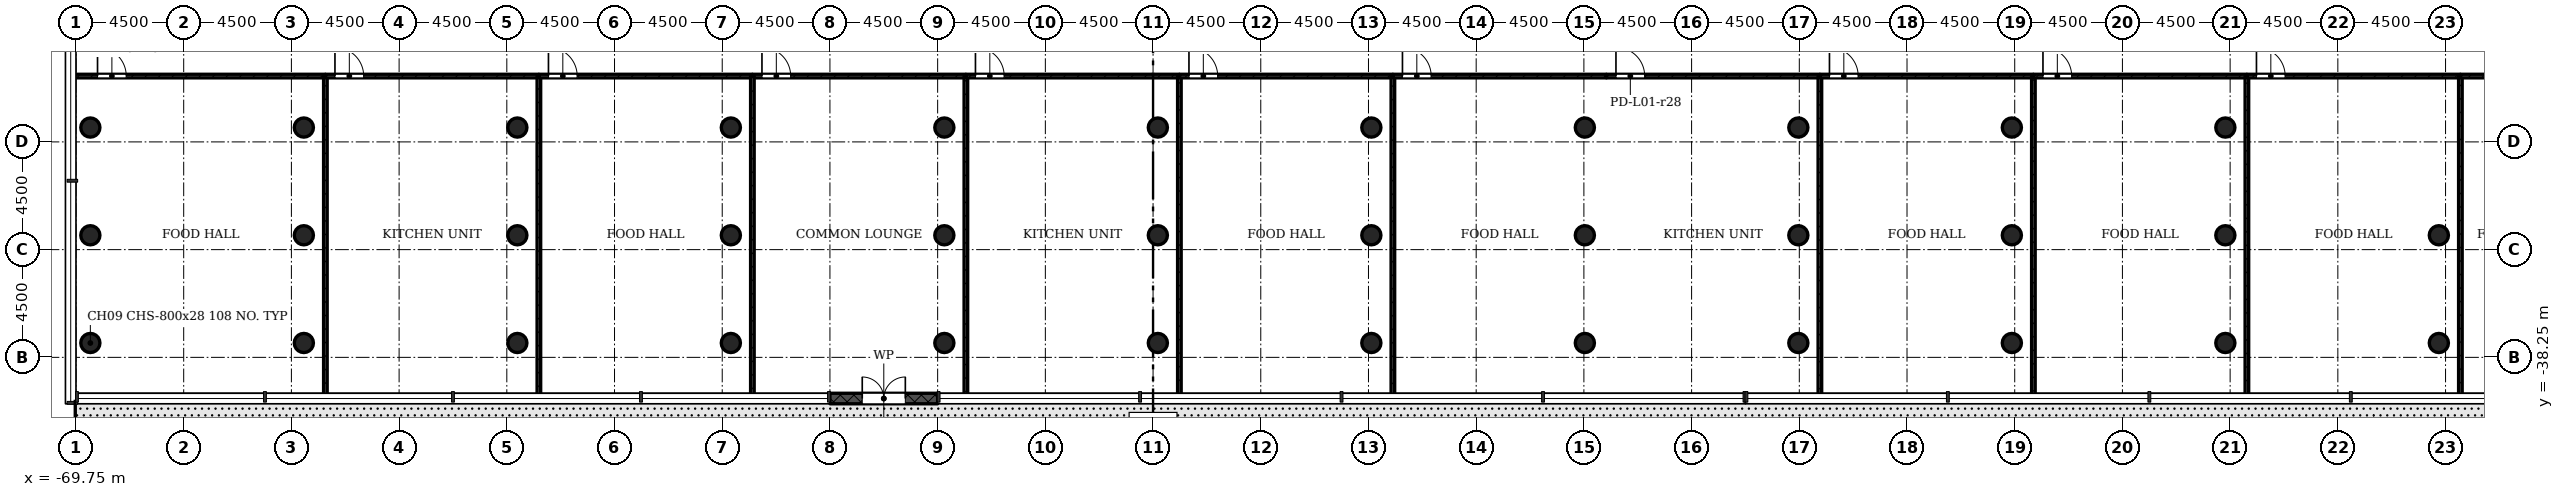
"""IFC4 building model, lengths in metres.
Left out: names, types, materials, properties, quantities, classifications, styles, units other than length and angle.
Written with IfcOpenShell. Run it as: python <this file> out.ifc"""

import sys

from ifc_helpers import new_model, si_unit, direction, frame, frame_2d, origin, origin_2d, place, context, subcontext, project, spatial, rectangle, hollow_circle, extrude, element, fill, save


model = new_model("IFC4")
c1 = context("Model", 3, precision=1e-05, world=origin(), true_north=direction((0.0, 1.0)))
c2 = subcontext(c1, "Body", "Model", "MODEL_VIEW")
j1 = project(units=[si_unit("LENGTHUNIT", "METRE"), si_unit("PLANEANGLEUNIT", "RADIAN")], contexts=[c1])
p1 = place(None, origin())
s1 = spatial("IfcSite", under=j1, at=p1, CompositionType="ELEMENT")
p2 = place(p1, origin())
s2 = spatial("IfcBuilding", under=s1, at=p2, CompositionType="ELEMENT")
p3 = place(p2, frame((0.0, 0.0, 6.0)))
s3 = spatial("IfcBuildingStorey", under=s2, at=p3, CompositionType="ELEMENT", Elevation=6.0)
for number, where, z_axis, x_axis in (
    (1, (-69.15, -37.65, 0.0), (0.0, 0.0, 1.0), (1.0, 0.0, 0.0)),
    (2, (-60.23, -37.65, 0.0), (0.0, 0.0, 1.0), (1.0, 0.0, 0.0)),
    (3, (-51.31, -37.65, 0.0), (0.0, 0.0, 1.0), (1.0, 0.0, 0.0)),
    (4, (-42.39, -37.65, 0.0), (0.0, 0.0, 1.0), (1.0, 0.0, 0.0)),
    (5, (-33.47, -37.65, 0.0), (0.0, 0.0, 1.0), (1.0, 0.0, 0.0)),
    (6, (-24.55, -37.65, 0.0), (0.0, 0.0, 1.0), (1.0, 0.0, 0.0)),
    (7, (-15.63, -37.65, 0.0), (0.0, 0.0, 1.0), (1.0, 0.0, 0.0)),
    (8, (-6.71, -37.65, 0.0), (0.0, 0.0, 1.0), (1.0, 0.0, 0.0)),
    (9, (2.21, -37.65, 0.0), (0.0, 0.0, 1.0), (1.0, 0.0, 0.0)),
    (10, (11.13, -37.65, 0.0), (0.0, 0.0, 1.0), (1.0, 0.0, 0.0)),
    (11, (20.05, -37.65, 0.0), (0.0, 0.0, 1.0), (1.0, 0.0, 0.0)),
    (12, (28.97, -37.65, 0.0), (0.0, 0.0, 1.0), (1.0, 0.0, 0.0)),
):
    element("IfcColumn", number, at=place(p3, frame(where, z_axis=z_axis, x_axis=x_axis)), inside=s3, PredefinedType="COLUMN", context=c2, shape_type="SweptSolid", body=[
        extrude(hollow_circle(Radius=0.4, WallThickness=0.028, at=origin_2d()), origin(), (0.0, 0.0, 1.0), 4.58),
    ])
for number, where, z_axis, x_axis in (
    (13, (-69.15, -33.15, 0.0), (0.0, 0.0, 1.0), (1.0, 0.0, 0.0)),
    (14, (-60.23, -33.15, 0.0), (0.0, 0.0, 1.0), (1.0, 0.0, 0.0)),
    (15, (-51.31, -33.15, 0.0), (0.0, 0.0, 1.0), (1.0, 0.0, 0.0)),
    (16, (-42.39, -33.15, 0.0), (0.0, 0.0, 1.0), (1.0, 0.0, 0.0)),
    (17, (-33.47, -33.15, 0.0), (0.0, 0.0, 1.0), (1.0, 0.0, 0.0)),
    (18, (-24.55, -33.15, 0.0), (0.0, 0.0, 1.0), (1.0, 0.0, 0.0)),
    (19, (-15.63, -33.15, 0.0), (0.0, 0.0, 1.0), (1.0, 0.0, 0.0)),
    (20, (-6.71, -33.15, 0.0), (0.0, 0.0, 1.0), (1.0, 0.0, 0.0)),
    (21, (2.21, -33.15, 0.0), (0.0, 0.0, 1.0), (1.0, 0.0, 0.0)),
    (22, (11.13, -33.15, 0.0), (0.0, 0.0, 1.0), (1.0, 0.0, 0.0)),
    (23, (20.05, -33.15, 0.0), (0.0, 0.0, 1.0), (1.0, 0.0, 0.0)),
    (24, (28.97, -33.15, 0.0), (0.0, 0.0, 1.0), (1.0, 0.0, 0.0)),
    (25, (-69.15, -28.65, 0.0), (0.0, 0.0, 1.0), (1.0, 0.0, 0.0)),
    (26, (-60.23, -28.65, 0.0), (0.0, 0.0, 1.0), (1.0, 0.0, 0.0)),
    (27, (-51.31, -28.65, 0.0), (0.0, 0.0, 1.0), (1.0, 0.0, 0.0)),
    (28, (-42.39, -28.65, 0.0), (0.0, 0.0, 1.0), (1.0, 0.0, 0.0)),
    (29, (-33.47, -28.65, 0.0), (0.0, 0.0, 1.0), (1.0, 0.0, 0.0)),
    (30, (-24.55, -28.65, 0.0), (0.0, 0.0, 1.0), (1.0, 0.0, 0.0)),
    (31, (-15.63, -28.65, 0.0), (0.0, 0.0, 1.0), (1.0, 0.0, 0.0)),
    (32, (-6.71, -28.65, 0.0), (0.0, 0.0, 1.0), (1.0, 0.0, 0.0)),
    (33, (2.21, -28.65, 0.0), (0.0, 0.0, 1.0), (1.0, 0.0, 0.0)),
    (34, (11.13, -28.65, 0.0), (0.0, 0.0, 1.0), (1.0, 0.0, 0.0)),
    (35, (20.05, -28.65, 0.0), (0.0, 0.0, 1.0), (1.0, 0.0, 0.0)),
):
    element("IfcColumn", number, at=place(p3, frame(where, z_axis=z_axis, x_axis=x_axis)), inside=s3, PredefinedType="COLUMN", context=c2, shape_type="SweptSolid", body=[
        extrude(hollow_circle(Radius=0.4, WallThickness=0.028, at=origin_2d()), origin(), (0.0, 0.0, 1.0), 5.0),
    ])
p4 = place(p3, frame((-38.25, -39.97, -0.02), z_axis=(0.0, 0.0, 1.0), x_axis=(1.0, 0.0, 0.0)))
e36 = element("IfcWall", 36, at=p4, inside=s3, PredefinedType="STANDARD", context=c2, shape_type="SweptSolid", body=[
    extrude(rectangle(XDim=4.5, YDim=0.44, at=frame_2d((2.25, 0.0))), origin(), (0.0, 0.0, 1.0), 4.72),
])
p5 = place(p4, frame((1.35, 0.0, 0.02)))
e37 = element("IfcOpeningElement", 37, at=p5, cuts=e36, PredefinedType="OPENING", context=c2, shape_type="SweptSolid", body=[
    extrude(rectangle(XDim=1.8, YDim=2.1, at=frame_2d((0.9, 1.05))), frame((0.0, 0.23, 0.0), z_axis=(0.0, -1.0, 0.0), x_axis=(1.0, 0.0, 0.0)), (0.0, 0.0, 1.0), 0.46),
])
p6 = place(p3, frame((-69.85, -26.5, 0.0), z_axis=(0.0, 0.0, 1.0), x_axis=(1.0, 0.0, 0.0)))
e38 = element("IfcWall", 38, at=p6, inside=s3, PredefinedType="PARTITIONING", context=c2, shape_type="SweptSolid", body=[
    extrude(rectangle(XDim=10.52, YDim=0.15, at=frame_2d((5.26, 0.0))), origin(), (0.0, 0.0, 1.0), 4.58),
])
p7 = place(p6, frame((1.0, 0.0, 0.0)))
e39 = element("IfcOpeningElement", 39, at=p7, cuts=e38, PredefinedType="OPENING", context=c2, shape_type="SweptSolid", body=[
    extrude(rectangle(XDim=1.2, YDim=2.1, at=frame_2d((0.6, 1.05))), frame((0.0, 0.085, 0.0), z_axis=(0.0, -1.0, 0.0), x_axis=(1.0, 0.0, 0.0)), (0.0, 0.0, 1.0), 0.17),
])
p8 = place(p3, frame((-59.33, -26.5, 0.0), z_axis=(0.0, 0.0, 1.0), x_axis=(0.0, -1.0, 0.0)))
e40 = element("IfcWall", 40, at=p8, inside=s3, PredefinedType="PARTITIONING", context=c2, shape_type="SweptSolid", body=[
    extrude(rectangle(XDim=13.35, YDim=0.15, at=frame_2d((6.675, 0.0))), origin(), (0.0, 0.0, 1.0), 4.58),
])
p9 = place(p3, frame((-59.33, -26.5, 0.0), z_axis=(0.0, 0.0, 1.0), x_axis=(1.0, 0.0, 0.0)))
e41 = element("IfcWall", 41, at=p9, inside=s3, PredefinedType="PARTITIONING", context=c2, shape_type="SweptSolid", body=[
    extrude(rectangle(XDim=8.92, YDim=0.15, at=frame_2d((4.46, 0.0))), origin(), (0.0, 0.0, 1.0), 4.58),
])
p10 = place(p9, frame((0.4, 0.0, 0.0)))
e42 = element("IfcOpeningElement", 42, at=p10, cuts=e41, PredefinedType="OPENING", context=c2, shape_type="SweptSolid", body=[
    extrude(rectangle(XDim=1.2, YDim=2.1, at=frame_2d((0.6, 1.05))), frame((0.0, 0.085, 0.0), z_axis=(0.0, -1.0, 0.0), x_axis=(1.0, 0.0, 0.0)), (0.0, 0.0, 1.0), 0.17),
])
p11 = place(p3, frame((-50.41, -26.5, 0.0), z_axis=(0.0, 0.0, 1.0), x_axis=(0.0, -1.0, 0.0)))
e43 = element("IfcWall", 43, at=p11, inside=s3, PredefinedType="PARTITIONING", context=c2, shape_type="SweptSolid", body=[
    extrude(rectangle(XDim=13.35, YDim=0.15, at=frame_2d((6.675, 0.0))), origin(), (0.0, 0.0, 1.0), 4.58),
])
p12 = place(p3, frame((-50.41, -26.5, 0.0), z_axis=(0.0, 0.0, 1.0), x_axis=(1.0, 0.0, 0.0)))
e44 = element("IfcWall", 44, at=p12, inside=s3, PredefinedType="PARTITIONING", context=c2, shape_type="SweptSolid", body=[
    extrude(rectangle(XDim=8.92, YDim=0.15, at=frame_2d((4.46, 0.0))), origin(), (0.0, 0.0, 1.0), 4.58),
])
p13 = place(p12, frame((0.4, 0.0, 0.0)))
e45 = element("IfcOpeningElement", 45, at=p13, cuts=e44, PredefinedType="OPENING", context=c2, shape_type="SweptSolid", body=[
    extrude(rectangle(XDim=1.2, YDim=2.1, at=frame_2d((0.6, 1.05))), frame((0.0, 0.085, 0.0), z_axis=(0.0, -1.0, 0.0), x_axis=(1.0, 0.0, 0.0)), (0.0, 0.0, 1.0), 0.17),
])
p14 = place(p3, frame((-41.49, -26.5, 0.0), z_axis=(0.0, 0.0, 1.0), x_axis=(1.0, 0.0, 0.0)))
e46 = element("IfcWall", 46, at=p14, inside=s3, PredefinedType="PARTITIONING", context=c2, shape_type="SweptSolid", body=[
    extrude(rectangle(XDim=8.92, YDim=0.15, at=frame_2d((4.46, 0.0))), origin(), (0.0, 0.0, 1.0), 4.58),
])
p15 = place(p14, frame((0.4, 0.0, 0.0)))
e47 = element("IfcOpeningElement", 47, at=p15, cuts=e46, PredefinedType="OPENING", context=c2, shape_type="SweptSolid", body=[
    extrude(rectangle(XDim=1.2, YDim=2.1, at=frame_2d((0.6, 1.05))), frame((0.0, 0.085, 0.0), z_axis=(0.0, -1.0, 0.0), x_axis=(1.0, 0.0, 0.0)), (0.0, 0.0, 1.0), 0.17),
])
for number, where, z_axis, x_axis in (
    (48, (-41.49, -39.85, 0.0), (0.0, 0.0, 1.0), (0.0, 1.0, 0.0)),
    (49, (-32.57, -26.5, 0.0), (0.0, 0.0, 1.0), (0.0, -1.0, 0.0)),
):
    element("IfcWall", number, at=place(p3, frame(where, z_axis=z_axis, x_axis=x_axis)), inside=s3, PredefinedType="PARTITIONING", context=c2, shape_type="SweptSolid", body=[
        extrude(rectangle(XDim=13.35, YDim=0.15, at=frame_2d((6.675, 0.0))), origin(), (0.0, 0.0, 1.0), 4.58),
    ])
p16 = place(p3, frame((-32.57, -26.5, 0.0), z_axis=(0.0, 0.0, 1.0), x_axis=(1.0, 0.0, 0.0)))
e50 = element("IfcWall", 50, at=p16, inside=s3, PredefinedType="PARTITIONING", context=c2, shape_type="SweptSolid", body=[
    extrude(rectangle(XDim=8.92, YDim=0.15, at=frame_2d((4.46, 0.0))), origin(), (0.0, 0.0, 1.0), 4.58),
])
p17 = place(p16, frame((0.4, 0.0, 0.0)))
e51 = element("IfcOpeningElement", 51, at=p17, cuts=e50, PredefinedType="OPENING", context=c2, shape_type="SweptSolid", body=[
    extrude(rectangle(XDim=1.2, YDim=2.1, at=frame_2d((0.6, 1.05))), frame((0.0, 0.085, 0.0), z_axis=(0.0, -1.0, 0.0), x_axis=(1.0, 0.0, 0.0)), (0.0, 0.0, 1.0), 0.17),
])
p18 = place(p3, frame((-23.65, -26.5, 0.0), z_axis=(0.0, 0.0, 1.0), x_axis=(0.0, -1.0, 0.0)))
e52 = element("IfcWall", 52, at=p18, inside=s3, PredefinedType="PARTITIONING", context=c2, shape_type="SweptSolid", body=[
    extrude(rectangle(XDim=13.35, YDim=0.15, at=frame_2d((6.675, 0.0))), origin(), (0.0, 0.0, 1.0), 4.58),
])
p19 = place(p3, frame((-23.65, -26.5, 0.0), z_axis=(0.0, 0.0, 1.0), x_axis=(1.0, 0.0, 0.0)))
e53 = element("IfcWall", 53, at=p19, inside=s3, PredefinedType="PARTITIONING", context=c2, shape_type="SweptSolid", body=[
    extrude(rectangle(XDim=8.92, YDim=0.15, at=frame_2d((4.46, 0.0))), origin(), (0.0, 0.0, 1.0), 4.58),
])
p20 = place(p19, frame((0.4, 0.0, 0.0)))
e54 = element("IfcOpeningElement", 54, at=p20, cuts=e53, PredefinedType="OPENING", context=c2, shape_type="SweptSolid", body=[
    extrude(rectangle(XDim=1.2, YDim=2.1, at=frame_2d((0.6, 1.05))), frame((0.0, 0.085, 0.0), z_axis=(0.0, -1.0, 0.0), x_axis=(1.0, 0.0, 0.0)), (0.0, 0.0, 1.0), 0.17),
])
p21 = place(p3, frame((-14.73, -26.5, 0.0), z_axis=(0.0, 0.0, 1.0), x_axis=(0.0, -1.0, 0.0)))
e55 = element("IfcWall", 55, at=p21, inside=s3, PredefinedType="PARTITIONING", context=c2, shape_type="SweptSolid", body=[
    extrude(rectangle(XDim=13.35, YDim=0.15, at=frame_2d((6.675, 0.0))), origin(), (0.0, 0.0, 1.0), 4.58),
])
p22 = place(p3, frame((-14.73, -26.5, 0.0), z_axis=(0.0, 0.0, 1.0), x_axis=(1.0, 0.0, 0.0)))
e56 = element("IfcWall", 56, at=p22, inside=s3, PredefinedType="PARTITIONING", context=c2, shape_type="SweptSolid", body=[
    extrude(rectangle(XDim=8.92, YDim=0.15, at=frame_2d((4.46, 0.0))), origin(), (0.0, 0.0, 1.0), 4.58),
])
p23 = place(p22, frame((0.4, 0.0, 0.0)))
e57 = element("IfcOpeningElement", 57, at=p23, cuts=e56, PredefinedType="OPENING", context=c2, shape_type="SweptSolid", body=[
    extrude(rectangle(XDim=1.2, YDim=2.1, at=frame_2d((0.6, 1.05))), frame((0.0, 0.085, 0.0), z_axis=(0.0, -1.0, 0.0), x_axis=(1.0, 0.0, 0.0)), (0.0, 0.0, 1.0), 0.17),
])
p24 = place(p3, frame((-5.81, -26.5, 0.0), z_axis=(0.0, 0.0, 1.0), x_axis=(1.0, 0.0, 0.0)))
e58 = element("IfcWall", 58, at=p24, inside=s3, PredefinedType="PARTITIONING", context=c2, shape_type="SweptSolid", body=[
    extrude(rectangle(XDim=8.92, YDim=0.15, at=frame_2d((4.46, 0.0))), origin(), (0.0, 0.0, 1.0), 4.58),
])
p25 = place(p24, frame((0.4, 0.0, 0.0)))
e59 = element("IfcOpeningElement", 59, at=p25, cuts=e58, PredefinedType="OPENING", context=c2, shape_type="SweptSolid", body=[
    extrude(rectangle(XDim=1.2, YDim=2.1, at=frame_2d((0.6, 1.05))), frame((0.0, 0.085, 0.0), z_axis=(0.0, -1.0, 0.0), x_axis=(1.0, 0.0, 0.0)), (0.0, 0.0, 1.0), 0.17),
])
p26 = place(p3, frame((3.11, -26.5, 0.0), z_axis=(0.0, 0.0, 1.0), x_axis=(0.0, -1.0, 0.0)))
e60 = element("IfcWall", 60, at=p26, inside=s3, PredefinedType="PARTITIONING", context=c2, shape_type="SweptSolid", body=[
    extrude(rectangle(XDim=13.35, YDim=0.15, at=frame_2d((6.675, 0.0))), origin(), (0.0, 0.0, 1.0), 4.58),
])
p27 = place(p3, frame((3.11, -26.5, 0.0), z_axis=(0.0, 0.0, 1.0), x_axis=(1.0, 0.0, 0.0)))
e61 = element("IfcWall", 61, at=p27, inside=s3, PredefinedType="PARTITIONING", context=c2, shape_type="SweptSolid", body=[
    extrude(rectangle(XDim=8.92, YDim=0.15, at=frame_2d((4.46, 0.0))), origin(), (0.0, 0.0, 1.0), 4.58),
])
p28 = place(p27, frame((0.4, 0.0, 0.0)))
e62 = element("IfcOpeningElement", 62, at=p28, cuts=e61, PredefinedType="OPENING", context=c2, shape_type="SweptSolid", body=[
    extrude(rectangle(XDim=1.2, YDim=2.1, at=frame_2d((0.6, 1.05))), frame((0.0, 0.085, 0.0), z_axis=(0.0, -1.0, 0.0), x_axis=(1.0, 0.0, 0.0)), (0.0, 0.0, 1.0), 0.17),
])
p29 = place(p3, frame((12.03, -26.5, 0.0), z_axis=(0.0, 0.0, 1.0), x_axis=(0.0, -1.0, 0.0)))
e63 = element("IfcWall", 63, at=p29, inside=s3, PredefinedType="PARTITIONING", context=c2, shape_type="SweptSolid", body=[
    extrude(rectangle(XDim=13.35, YDim=0.15, at=frame_2d((6.675, 0.0))), origin(), (0.0, 0.0, 1.0), 4.58),
])
p30 = place(p3, frame((12.03, -26.5, 0.0), z_axis=(0.0, 0.0, 1.0), x_axis=(1.0, 0.0, 0.0)))
e64 = element("IfcWall", 64, at=p30, inside=s3, PredefinedType="PARTITIONING", context=c2, shape_type="SweptSolid", body=[
    extrude(rectangle(XDim=8.92, YDim=0.15, at=frame_2d((4.46, 0.0))), origin(), (0.0, 0.0, 1.0), 4.58),
])
p31 = place(p30, frame((0.4, 0.0, 0.0)))
e65 = element("IfcOpeningElement", 65, at=p31, cuts=e64, PredefinedType="OPENING", context=c2, shape_type="SweptSolid", body=[
    extrude(rectangle(XDim=1.2, YDim=2.1, at=frame_2d((0.6, 1.05))), frame((0.0, 0.085, 0.0), z_axis=(0.0, -1.0, 0.0), x_axis=(1.0, 0.0, 0.0)), (0.0, 0.0, 1.0), 0.17),
])
p32 = place(p3, frame((20.95, -26.5, 0.0), z_axis=(0.0, 0.0, 1.0), x_axis=(0.0, -1.0, 0.0)))
e66 = element("IfcWall", 66, at=p32, inside=s3, PredefinedType="PARTITIONING", context=c2, shape_type="SweptSolid", body=[
    extrude(rectangle(XDim=13.35, YDim=0.15, at=frame_2d((6.675, 0.0))), origin(), (0.0, 0.0, 1.0), 4.58),
])
p33 = place(p3, frame((20.95, -26.5, 0.0), z_axis=(0.0, 0.0, 1.0), x_axis=(1.0, 0.0, 0.0)))
e67 = element("IfcWall", 67, at=p33, inside=s3, PredefinedType="PARTITIONING", context=c2, shape_type="SweptSolid", body=[
    extrude(rectangle(XDim=8.92, YDim=0.15, at=frame_2d((4.46, 0.0))), origin(), (0.0, 0.0, 1.0), 4.58),
])
p34 = place(p33, frame((0.4, 0.0, 0.0)))
e68 = element("IfcOpeningElement", 68, at=p34, cuts=e67, PredefinedType="OPENING", context=c2, shape_type="SweptSolid", body=[
    extrude(rectangle(XDim=1.2, YDim=2.1, at=frame_2d((0.6, 1.05))), frame((0.0, 0.085, 0.0), z_axis=(0.0, -1.0, 0.0), x_axis=(1.0, 0.0, 0.0)), (0.0, 0.0, 1.0), 0.17),
])
p35 = place(p3, frame((29.87, -26.5, 0.0), z_axis=(0.0, 0.0, 1.0), x_axis=(0.0, -1.0, 0.0)))
e69 = element("IfcWall", 69, at=p35, inside=s3, PredefinedType="PARTITIONING", context=c2, shape_type="SweptSolid", body=[
    extrude(rectangle(XDim=13.35, YDim=0.15, at=frame_2d((6.675, 0.0))), origin(), (0.0, 0.0, 1.0), 4.58),
])
p36 = place(p3, frame((29.87, -26.5, 0.0), z_axis=(0.0, 0.0, 1.0), x_axis=(1.0, 0.0, 0.0)))
e70 = element("IfcWall", 70, at=p36, inside=s3, PredefinedType="PARTITIONING", context=c2, shape_type="SweptSolid", body=[
    extrude(rectangle(XDim=4.63, YDim=0.15, at=frame_2d((2.315, 0.0))), origin(), (0.0, 0.0, 1.0), 4.58),
])
p37 = place(p5, origin())
e71 = element("IfcDoor", 71, at=p37, inside=s3, OperationType="DOUBLE_DOOR_SINGLE_SWING", PredefinedType="DOOR", context=c2, shape_type="SweptSolid", body=[
    extrude(rectangle(XDim=1.8, YDim=2.1, at=frame_2d((0.9, 1.05))), frame((0.0, 0.025, 0.0), z_axis=(0.0, -1.0, 0.0), x_axis=(1.0, 0.0, 0.0)), (0.0, 0.0, 1.0), 0.05),
])
fill(e37, e71)
p38 = place(p7, origin())
e72 = element("IfcDoor", 72, at=p38, inside=s3, OperationType="SINGLE_SWING_RIGHT", PredefinedType="DOOR", context=c2, shape_type="SweptSolid", body=[
    extrude(rectangle(XDim=1.2, YDim=2.1, at=frame_2d((0.6, 1.05))), frame((0.0, 0.025, 0.0), z_axis=(0.0, -1.0, 0.0), x_axis=(1.0, 0.0, 0.0)), (0.0, 0.0, 1.0), 0.05),
])
fill(e39, e72)
p39 = place(p10, origin())
e73 = element("IfcDoor", 73, at=p39, inside=s3, OperationType="SINGLE_SWING_RIGHT", PredefinedType="DOOR", context=c2, shape_type="SweptSolid", body=[
    extrude(rectangle(XDim=1.2, YDim=2.1, at=frame_2d((0.6, 1.05))), frame((0.0, 0.025, 0.0), z_axis=(0.0, -1.0, 0.0), x_axis=(1.0, 0.0, 0.0)), (0.0, 0.0, 1.0), 0.05),
])
fill(e42, e73)
p40 = place(p13, origin())
e74 = element("IfcDoor", 74, at=p40, inside=s3, OperationType="SINGLE_SWING_RIGHT", PredefinedType="DOOR", context=c2, shape_type="SweptSolid", body=[
    extrude(rectangle(XDim=1.2, YDim=2.1, at=frame_2d((0.6, 1.05))), frame((0.0, 0.025, 0.0), z_axis=(0.0, -1.0, 0.0), x_axis=(1.0, 0.0, 0.0)), (0.0, 0.0, 1.0), 0.05),
])
fill(e45, e74)
p41 = place(p15, origin())
e75 = element("IfcDoor", 75, at=p41, inside=s3, OperationType="SINGLE_SWING_RIGHT", PredefinedType="DOOR", context=c2, shape_type="SweptSolid", body=[
    extrude(rectangle(XDim=1.2, YDim=2.1, at=frame_2d((0.6, 1.05))), frame((0.0, 0.025, 0.0), z_axis=(0.0, -1.0, 0.0), x_axis=(1.0, 0.0, 0.0)), (0.0, 0.0, 1.0), 0.05),
])
fill(e47, e75)
p42 = place(p17, origin())
e76 = element("IfcDoor", 76, at=p42, inside=s3, OperationType="SINGLE_SWING_RIGHT", PredefinedType="DOOR", context=c2, shape_type="SweptSolid", body=[
    extrude(rectangle(XDim=1.2, YDim=2.1, at=frame_2d((0.6, 1.05))), frame((0.0, 0.025, 0.0), z_axis=(0.0, -1.0, 0.0), x_axis=(1.0, 0.0, 0.0)), (0.0, 0.0, 1.0), 0.05),
])
fill(e51, e76)
p43 = place(p20, origin())
e77 = element("IfcDoor", 77, at=p43, inside=s3, OperationType="SINGLE_SWING_RIGHT", PredefinedType="DOOR", context=c2, shape_type="SweptSolid", body=[
    extrude(rectangle(XDim=1.2, YDim=2.1, at=frame_2d((0.6, 1.05))), frame((0.0, 0.025, 0.0), z_axis=(0.0, -1.0, 0.0), x_axis=(1.0, 0.0, 0.0)), (0.0, 0.0, 1.0), 0.05),
])
fill(e54, e77)
p44 = place(p23, origin())
e78 = element("IfcDoor", 78, at=p44, inside=s3, OperationType="SINGLE_SWING_RIGHT", PredefinedType="DOOR", context=c2, shape_type="SweptSolid", body=[
    extrude(rectangle(XDim=1.2, YDim=2.1, at=frame_2d((0.6, 1.05))), frame((0.0, 0.025, 0.0), z_axis=(0.0, -1.0, 0.0), x_axis=(1.0, 0.0, 0.0)), (0.0, 0.0, 1.0), 0.05),
])
fill(e57, e78)
p45 = place(p25, origin())
e79 = element("IfcDoor", 79, at=p45, inside=s3, OperationType="SINGLE_SWING_RIGHT", PredefinedType="DOOR", context=c2, shape_type="SweptSolid", body=[
    extrude(rectangle(XDim=1.2, YDim=2.1, at=frame_2d((0.6, 1.05))), frame((0.0, 0.025, 0.0), z_axis=(0.0, -1.0, 0.0), x_axis=(1.0, 0.0, 0.0)), (0.0, 0.0, 1.0), 0.05),
])
fill(e59, e79)
p46 = place(p28, origin())
e80 = element("IfcDoor", 80, at=p46, inside=s3, OperationType="SINGLE_SWING_RIGHT", PredefinedType="DOOR", context=c2, shape_type="SweptSolid", body=[
    extrude(rectangle(XDim=1.2, YDim=2.1, at=frame_2d((0.6, 1.05))), frame((0.0, 0.025, 0.0), z_axis=(0.0, -1.0, 0.0), x_axis=(1.0, 0.0, 0.0)), (0.0, 0.0, 1.0), 0.05),
])
fill(e62, e80)
p47 = place(p31, origin())
e81 = element("IfcDoor", 81, at=p47, inside=s3, OperationType="SINGLE_SWING_RIGHT", PredefinedType="DOOR", context=c2, shape_type="SweptSolid", body=[
    extrude(rectangle(XDim=1.2, YDim=2.1, at=frame_2d((0.6, 1.05))), frame((0.0, 0.025, 0.0), z_axis=(0.0, -1.0, 0.0), x_axis=(1.0, 0.0, 0.0)), (0.0, 0.0, 1.0), 0.05),
])
fill(e65, e81)
p48 = place(p34, origin())
e82 = element("IfcDoor", 82, at=p48, inside=s3, OperationType="SINGLE_SWING_RIGHT", PredefinedType="DOOR", context=c2, shape_type="SweptSolid", body=[
    extrude(rectangle(XDim=1.2, YDim=2.1, at=frame_2d((0.6, 1.05))), frame((0.0, 0.025, 0.0), z_axis=(0.0, -1.0, 0.0), x_axis=(1.0, 0.0, 0.0)), (0.0, 0.0, 1.0), 0.05),
])
fill(e68, e82)
save(model, sys.argv[1])
